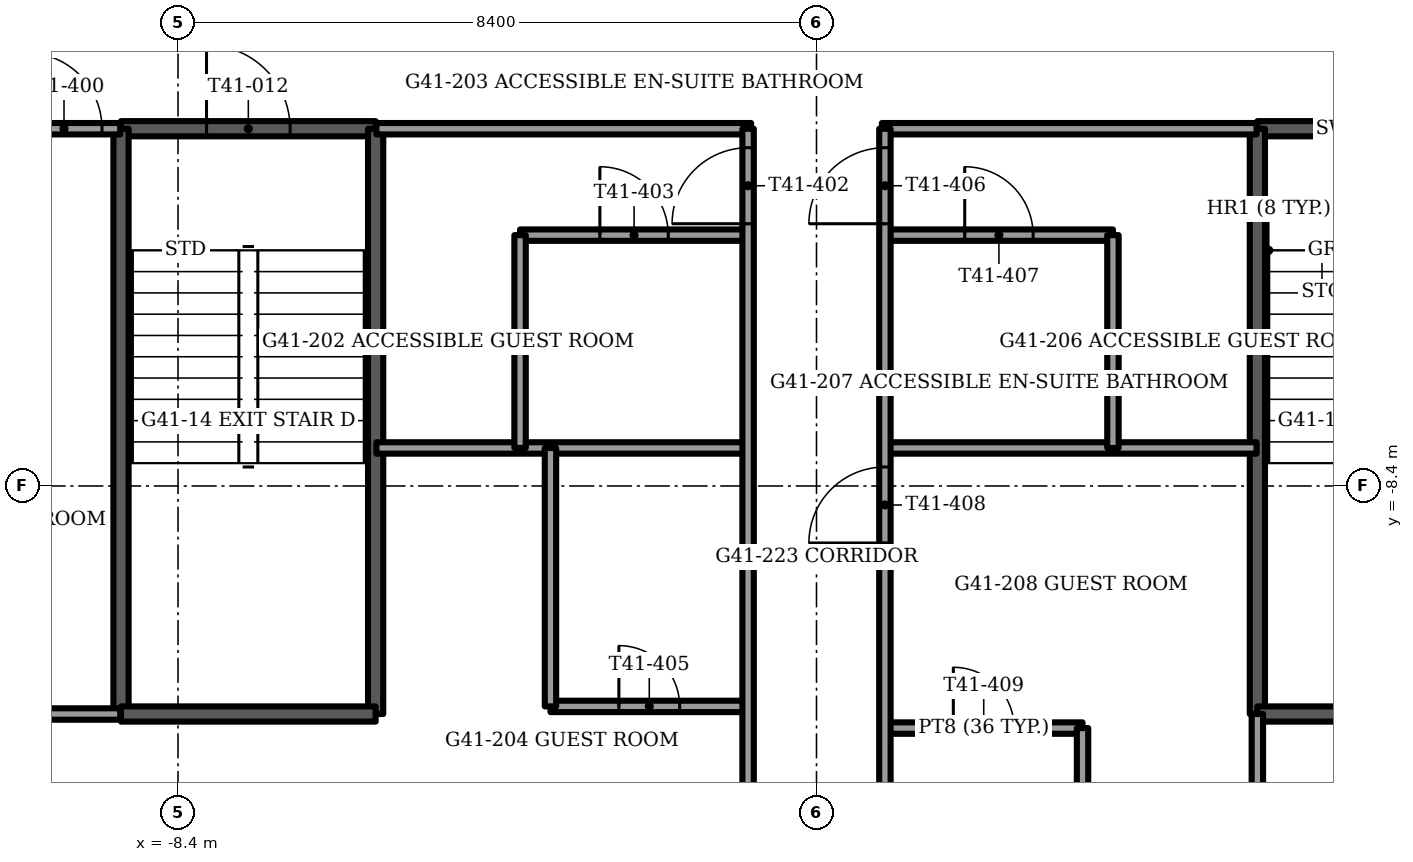
"""IFC4 building model, lengths in metres.
Left out: names, types, materials, properties, quantities, classifications, styles, units other than length and angle.
Written with IfcOpenShell. Run it as: python <this file> out.ifc"""

import sys

from ifc_helpers import new_model, si_unit, direction, frame, frame_2d, origin, place, context, subcontext, project, spatial, rectangle, extrude, element, fill, save


model = new_model("IFC4")
c1 = context("Model", 3, precision=1e-05, world=origin(), true_north=direction((0.0, 1.0)))
c2 = subcontext(c1, "Body", "Model", "MODEL_VIEW")
j1 = project(units=[si_unit("LENGTHUNIT", "METRE"), si_unit("PLANEANGLEUNIT", "RADIAN")], contexts=[c1])
p1 = place(None, origin())
s1 = spatial("IfcSite", under=j1, at=p1, CompositionType="ELEMENT")
p2 = place(p1, origin())
s2 = spatial("IfcBuilding", under=s1, at=p2, CompositionType="ELEMENT")
p3 = place(p2, frame((0.0, 0.0, 168.25)))
s3 = spatial("IfcBuildingStorey", under=s2, at=p3, CompositionType="ELEMENT", Elevation=168.25)
p4 = place(p3, frame((-17.287, -0.909, 0.0), z_axis=(0.0, 0.0, 1.0), x_axis=(0.500004460396, -0.866022828558, 0.0)))
e1 = element("IfcWall", 1, at=p4, inside=s3, PredefinedType="SOLIDWALL", context=c2, shape_type="SweptSolid", body=[
    extrude(rectangle(XDim=15.712, YDim=0.15, at=frame_2d((7.856, 0.0))), origin(), (0.0, 0.0, 1.0), 3.45),
])
p5 = place(p4, frame((1.856, 0.0, 0.15)))
e2 = element("IfcOpeningElement", 2, at=p5, cuts=e1, PredefinedType="OPENING", context=c2, shape_type="SweptSolid", body=[
    extrude(rectangle(XDim=0.9, YDim=2.85, at=frame_2d((0.45, 1.425))), frame((0.0, 0.075, 0.0), z_axis=(0.0, -1.0, 0.0), x_axis=(1.0, 0.0, 0.0)), (0.0, 0.0, 1.0), 0.15),
])
p6 = place(p4, frame((4.056, 0.0, 0.15)))
e3 = element("IfcOpeningElement", 3, at=p6, cuts=e1, PredefinedType="OPENING", context=c2, shape_type="SweptSolid", body=[
    extrude(rectangle(XDim=1.4, YDim=2.85, at=frame_2d((0.7, 1.425))), frame((0.0, 0.075, 0.0), z_axis=(0.0, -1.0, 0.0), x_axis=(1.0, 0.0, 0.0)), (0.0, 0.0, 1.0), 0.15),
])
p7 = place(p4, frame((6.549, 0.0, 0.15)))
e4 = element("IfcOpeningElement", 4, at=p7, cuts=e1, PredefinedType="OPENING", context=c2, shape_type="SweptSolid", body=[
    extrude(rectangle(XDim=1.6, YDim=2.85, at=frame_2d((0.8, 1.425))), frame((0.0, 0.075, 0.0), z_axis=(0.0, -1.0, 0.0), x_axis=(1.0, 0.0, 0.0)), (0.0, 0.0, 1.0), 0.15),
])
p8 = place(p4, frame((8.256, 0.0, 0.0)))
e5 = element("IfcOpeningElement", 5, at=p8, cuts=e1, PredefinedType="OPENING", context=c2, shape_type="SweptSolid", body=[
    extrude(rectangle(XDim=1.4, YDim=2.4, at=frame_2d((0.7, 1.2))), frame((0.0, 0.075, 0.0), z_axis=(0.0, -1.0, 0.0), x_axis=(1.0, 0.0, 0.0)), (0.0, 0.0, 1.0), 0.15),
])
p9 = place(p4, frame((10.256, 0.0, 0.15)))
e6 = element("IfcOpeningElement", 6, at=p9, cuts=e1, PredefinedType="OPENING", context=c2, shape_type="SweptSolid", body=[
    extrude(rectangle(XDim=0.9, YDim=2.85, at=frame_2d((0.45, 1.425))), frame((0.0, 0.075, 0.0), z_axis=(0.0, -1.0, 0.0), x_axis=(1.0, 0.0, 0.0)), (0.0, 0.0, 1.0), 0.15),
])
p10 = place(p3, frame((5.8, -3.7, -0.3), z_axis=(0.0, 0.0, 1.0), x_axis=(1.0, 0.0, 0.0)))
e7 = element("IfcWall", 7, at=p10, inside=s3, PredefinedType="SOLIDWALL", context=c2, shape_type="SweptSolid", body=[
    extrude(rectangle(XDim=3.35, YDim=0.2, at=frame_2d((1.675, 0.0))), origin(), (0.0, 0.0, 1.0), 3.75),
])
p11 = place(p10, frame((1.125, 0.0, 0.0)))
e8 = element("IfcOpeningElement", 8, at=p11, cuts=e7, PredefinedType="OPENING", context=c2, shape_type="SweptSolid", body=[
    extrude(rectangle(XDim=1.1, YDim=2.1, at=frame_2d((0.55, 1.05))), frame((0.0, 0.1, 0.0), z_axis=(0.0, -1.0, 0.0), x_axis=(1.0, 0.0, 0.0)), (0.0, 0.0, 1.0), 0.2),
])
p12 = place(p3, frame((5.8, -3.7, -0.3), z_axis=(0.0, 0.0, 1.0), x_axis=(0.0, -1.0, 0.0)))
e9 = element("IfcWall", 9, at=p12, inside=s3, PredefinedType="SOLIDWALL", context=c2, shape_type="SweptSolid", body=[
    extrude(rectangle(XDim=7.7, YDim=0.2, at=frame_2d((3.85, 0.0))), origin(), (0.0, 0.0, 1.0), 3.75),
])
p13 = place(p3, frame((5.8, -11.4, -0.3), z_axis=(0.0, 0.0, 1.0), x_axis=(1.0, 0.0, 0.0)))
e10 = element("IfcWall", 10, at=p13, inside=s3, PredefinedType="SOLIDWALL", context=c2, shape_type="SweptSolid", body=[
    extrude(rectangle(XDim=3.35, YDim=0.2, at=frame_2d((1.675, 0.0))), origin(), (0.0, 0.0, 1.0), 3.75),
])
p14 = place(p3, frame((5.8, -11.4, 0.0), z_axis=(0.0, 0.0, 1.0), x_axis=(0.0, -1.0, 0.0)))
e11 = element("IfcWall", 11, at=p14, inside=s3, PredefinedType="PARTITIONING", context=c2, shape_type="SweptSolid", body=[
    extrude(rectangle(XDim=3.574, YDim=0.15, at=frame_2d((1.787, 0.0))), origin(), (0.0, 0.0, 1.0), 3.45),
])
p15 = place(p3, frame((-9.15, -3.7, -0.3), z_axis=(0.0, 0.0, 1.0), x_axis=(1.0, 0.0, 0.0)))
e12 = element("IfcWall", 12, at=p15, inside=s3, PredefinedType="SOLIDWALL", context=c2, shape_type="SweptSolid", body=[
    extrude(rectangle(XDim=3.35, YDim=0.2, at=frame_2d((1.675, 0.0))), origin(), (0.0, 0.0, 1.0), 3.75),
])
p16 = place(p15, frame((1.125, 0.0, 0.0)))
e13 = element("IfcOpeningElement", 13, at=p16, cuts=e12, PredefinedType="OPENING", context=c2, shape_type="SweptSolid", body=[
    extrude(rectangle(XDim=1.1, YDim=2.1, at=frame_2d((0.55, 1.05))), frame((0.0, 0.1, 0.0), z_axis=(0.0, -1.0, 0.0), x_axis=(1.0, 0.0, 0.0)), (0.0, 0.0, 1.0), 0.2),
])
for number, where, z_axis, x_axis in (
    (14, (-9.15, -3.7, -0.3), (0.0, 0.0, 1.0), (0.0, -1.0, 0.0)),
    (15, (-5.8, -3.7, -0.3), (0.0, 0.0, 1.0), (0.0, -1.0, 0.0)),
):
    element("IfcWall", number, at=place(p3, frame(where, z_axis=z_axis, x_axis=x_axis)), inside=s3, PredefinedType="SOLIDWALL", context=c2, shape_type="SweptSolid", body=[
        extrude(rectangle(XDim=7.7, YDim=0.2, at=frame_2d((3.85, 0.0))), origin(), (0.0, 0.0, 1.0), 3.75),
    ])
p17 = place(p3, frame((-9.15, -11.4, -0.3), z_axis=(0.0, 0.0, 1.0), x_axis=(1.0, 0.0, 0.0)))
e16 = element("IfcWall", 16, at=p17, inside=s3, PredefinedType="SOLIDWALL", context=c2, shape_type="SweptSolid", body=[
    extrude(rectangle(XDim=3.35, YDim=0.2, at=frame_2d((1.675, 0.0))), origin(), (0.0, 0.0, 1.0), 3.75),
])
p18 = place(p3, frame((0.9, -11.585, 0.0), z_axis=(0.0, 0.0, 1.0), x_axis=(1.0, 0.0, 0.0)))
e17 = element("IfcWall", 17, at=p18, inside=s3, PredefinedType="PARTITIONING", context=c2, shape_type="SweptSolid", body=[
    extrude(rectangle(XDim=2.6, YDim=0.15, at=frame_2d((1.3, 0.0))), origin(), (0.0, 0.0, 1.0), 3.45),
])
p19 = place(p18, frame((0.9, 0.0, 0.0)))
e18 = element("IfcOpeningElement", 18, at=p19, cuts=e17, PredefinedType="OPENING", context=c2, shape_type="SweptSolid", body=[
    extrude(rectangle(XDim=0.8, YDim=2.1, at=frame_2d((0.4, 1.05))), frame((0.0, 0.075, 0.0), z_axis=(0.0, -1.0, 0.0), x_axis=(1.0, 0.0, 0.0)), (0.0, 0.0, 1.0), 0.15),
])
p20 = place(p3, frame((-11.281, -11.4, 0.0), z_axis=(0.0, 0.0, 1.0), x_axis=(1.0, 0.0, 0.0)))
e19 = element("IfcWall", 19, at=p20, inside=s3, PredefinedType="PARTITIONING", context=c2, shape_type="SweptSolid", body=[
    extrude(rectangle(XDim=2.121, YDim=0.15, at=frame_2d((1.061, 0.0))), origin(), (0.0, 0.0, 1.0), 3.45),
])
p21 = place(p3, frame((-3.5, -11.3, 0.0), z_axis=(0.0, 0.0, 1.0), x_axis=(1.0, 0.0, 0.0)))
e20 = element("IfcWall", 20, at=p21, inside=s3, PredefinedType="PARTITIONING", context=c2, shape_type="SweptSolid", body=[
    extrude(rectangle(XDim=2.6, YDim=0.15, at=frame_2d((1.3, 0.0))), origin(), (0.0, 0.0, 1.0), 3.45),
])
p22 = place(p21, frame((0.9, 0.0, 0.0)))
e21 = element("IfcOpeningElement", 21, at=p22, cuts=e20, PredefinedType="OPENING", context=c2, shape_type="SweptSolid", body=[
    extrude(rectangle(XDim=0.8, YDim=2.1, at=frame_2d((0.4, 1.05))), frame((0.0, 0.075, 0.0), z_axis=(0.0, -1.0, 0.0), x_axis=(1.0, 0.0, 0.0)), (0.0, 0.0, 1.0), 0.15),
])
for number, where, z_axis, x_axis in (
    (22, (-5.79, -7.9, 0.0), (0.0, 0.0, 1.0), (1.0, 0.0, 0.0)),
    (23, (0.9, -7.9, 0.0), (0.0, 0.0, 1.0), (1.0, 0.0, 0.0)),
):
    element("IfcWall", number, at=place(p3, frame(where, z_axis=z_axis, x_axis=x_axis)), inside=s3, PredefinedType="PARTITIONING", context=c2, shape_type="SweptSolid", body=[
        extrude(rectangle(XDim=4.89, YDim=0.15, at=frame_2d((2.445, 0.0))), origin(), (0.0, 0.0, 1.0), 3.45),
    ])
p23 = place(p3, frame((-3.9, -5.1, 0.0), z_axis=(0.0, 0.0, 1.0), x_axis=(1.0, 0.0, 0.0)))
e24 = element("IfcWall", 24, at=p23, inside=s3, PredefinedType="PARTITIONING", context=c2, shape_type="SweptSolid", body=[
    extrude(rectangle(XDim=3.0, YDim=0.15, at=frame_2d((1.5, 0.0))), origin(), (0.0, 0.0, 1.0), 3.45),
])
p24 = place(p23, frame((1.05, 0.0, 0.0)))
e25 = element("IfcOpeningElement", 25, at=p24, cuts=e24, PredefinedType="OPENING", context=c2, shape_type="SweptSolid", body=[
    extrude(rectangle(XDim=0.9, YDim=2.1, at=frame_2d((0.45, 1.05))), frame((0.0, 0.075, 0.0), z_axis=(0.0, -1.0, 0.0), x_axis=(1.0, 0.0, 0.0)), (0.0, 0.0, 1.0), 0.15),
])
p25 = place(p3, frame((0.9, -5.1, 0.0), z_axis=(0.0, 0.0, 1.0), x_axis=(1.0, 0.0, 0.0)))
e26 = element("IfcWall", 26, at=p25, inside=s3, PredefinedType="PARTITIONING", context=c2, shape_type="SweptSolid", body=[
    extrude(rectangle(XDim=3.0, YDim=0.15, at=frame_2d((1.5, 0.0))), origin(), (0.0, 0.0, 1.0), 3.45),
])
p26 = place(p25, frame((1.05, 0.0, 0.0)))
e27 = element("IfcOpeningElement", 27, at=p26, cuts=e26, PredefinedType="OPENING", context=c2, shape_type="SweptSolid", body=[
    extrude(rectangle(XDim=0.9, YDim=2.1, at=frame_2d((0.45, 1.05))), frame((0.0, 0.075, 0.0), z_axis=(0.0, -1.0, 0.0), x_axis=(1.0, 0.0, 0.0)), (0.0, 0.0, 1.0), 0.15),
])
p27 = place(p3, frame((-15.727, -3.7, 0.0), z_axis=(0.0, 0.0, 1.0), x_axis=(1.0, 0.0, 0.0)))
e28 = element("IfcWall", 28, at=p27, inside=s3, PredefinedType="PARTITIONING", context=c2, shape_type="SweptSolid", body=[
    extrude(rectangle(XDim=6.567, YDim=0.15, at=frame_2d((3.284, 0.0))), origin(), (0.0, 0.0, 1.0), 3.45),
])
p28 = place(p27, frame((5.327, 0.0, 0.0)))
e29 = element("IfcOpeningElement", 29, at=p28, cuts=e28, PredefinedType="OPENING", context=c2, shape_type="SweptSolid", body=[
    extrude(rectangle(XDim=1.0, YDim=2.1, at=frame_2d((0.5, 1.05))), frame((0.0, 0.075, 0.0), z_axis=(0.0, -1.0, 0.0), x_axis=(1.0, 0.0, 0.0)), (0.0, 0.0, 1.0), 0.15),
])
for number, where, z_axis, x_axis in (
    (30, (-5.79, -3.7, 0.0), (0.0, 0.0, 1.0), (1.0, 0.0, 0.0)),
    (31, (0.86, -3.7, 0.0), (0.0, 0.0, 1.0), (1.0, 0.0, 0.0)),
):
    element("IfcWall", number, at=place(p3, frame(where, z_axis=z_axis, x_axis=x_axis)), inside=s3, PredefinedType="PARTITIONING", context=c2, shape_type="SweptSolid", body=[
        extrude(rectangle(XDim=4.93, YDim=0.15, at=frame_2d((2.465, 0.0))), origin(), (0.0, 0.0, 1.0), 3.45),
    ])
p29 = place(p3, frame((3.9, -7.9, 0.0), z_axis=(0.0, 0.0, 1.0), x_axis=(0.0, 1.0, 0.0)))
e32 = element("IfcWall", 32, at=p29, inside=s3, PredefinedType="PARTITIONING", context=c2, shape_type="SweptSolid", body=[
    extrude(rectangle(XDim=2.8, YDim=0.15, at=frame_2d((1.4, 0.0))), origin(), (0.0, 0.0, 1.0), 3.45),
])
p30 = place(p3, frame((3.5, -15.094, 0.0), z_axis=(0.0, 0.0, 1.0), x_axis=(0.0, 1.0, 0.0)))
e33 = element("IfcWall", 33, at=p30, inside=s3, PredefinedType="PARTITIONING", context=c2, shape_type="SweptSolid", body=[
    extrude(rectangle(XDim=3.509, YDim=0.15, at=frame_2d((1.754, 0.0))), origin(), (0.0, 0.0, 1.0), 3.45),
])
p31 = place(p3, frame((0.9, -15.094, 0.0), z_axis=(0.0, 0.0, 1.0), x_axis=(0.0, 1.0, 0.0)))
e34 = element("IfcWall", 34, at=p31, inside=s3, PredefinedType="PARTITIONING", context=c2, shape_type="SweptSolid", body=[
    extrude(rectangle(XDim=11.394, YDim=0.15, at=frame_2d((5.697, 0.0))), origin(), (0.0, 0.0, 1.0), 3.45),
])
p32 = place(p31, frame((10.144, 0.0, 0.0)))
e35 = element("IfcOpeningElement", 35, at=p32, cuts=e34, PredefinedType="OPENING", context=c2, shape_type="SweptSolid", body=[
    extrude(rectangle(XDim=1.0, YDim=2.1, at=frame_2d((0.5, 1.05))), frame((0.0, 0.075, 0.0), z_axis=(0.0, -1.0, 0.0), x_axis=(1.0, 0.0, 0.0)), (0.0, 0.0, 1.0), 0.15),
])
p33 = place(p31, frame((5.944, 0.0, 0.0)))
e36 = element("IfcOpeningElement", 36, at=p33, cuts=e34, PredefinedType="OPENING", context=c2, shape_type="SweptSolid", body=[
    extrude(rectangle(XDim=1.0, YDim=2.1, at=frame_2d((0.5, 1.05))), frame((0.0, 0.075, 0.0), z_axis=(0.0, -1.0, 0.0), x_axis=(1.0, 0.0, 0.0)), (0.0, 0.0, 1.0), 0.15),
])
p34 = place(p3, frame((-0.9, -15.094, 0.0), z_axis=(0.0, 0.0, 1.0), x_axis=(0.0, 1.0, 0.0)))
e37 = element("IfcWall", 37, at=p34, inside=s3, PredefinedType="PARTITIONING", context=c2, shape_type="SweptSolid", body=[
    extrude(rectangle(XDim=11.394, YDim=0.15, at=frame_2d((5.697, 0.0))), origin(), (0.0, 0.0, 1.0), 3.45),
])
p35 = place(p34, frame((10.144, 0.0, 0.0)))
e38 = element("IfcOpeningElement", 38, at=p35, cuts=e37, PredefinedType="OPENING", context=c2, shape_type="SweptSolid", body=[
    extrude(rectangle(XDim=1.0, YDim=2.1, at=frame_2d((0.5, 1.05))), frame((0.0, 0.075, 0.0), z_axis=(0.0, -1.0, 0.0), x_axis=(1.0, 0.0, 0.0)), (0.0, 0.0, 1.0), 0.15),
])
p36 = place(p34, frame((0.369, 0.0, 0.0)))
e39 = element("IfcOpeningElement", 39, at=p36, cuts=e37, PredefinedType="OPENING", context=c2, shape_type="SweptSolid", body=[
    extrude(rectangle(XDim=1.0, YDim=2.1, at=frame_2d((0.5, 1.05))), frame((0.0, 0.075, 0.0), z_axis=(0.0, -1.0, 0.0), x_axis=(1.0, 0.0, 0.0)), (0.0, 0.0, 1.0), 0.15),
])
p37 = place(p3, frame((-3.5, -11.3, 0.0), z_axis=(0.0, 0.0, 1.0), x_axis=(0.0, 1.0, 0.0)))
e40 = element("IfcWall", 40, at=p37, inside=s3, PredefinedType="PARTITIONING", context=c2, shape_type="SweptSolid", body=[
    extrude(rectangle(XDim=3.4, YDim=0.15, at=frame_2d((1.7, 0.0))), origin(), (0.0, 0.0, 1.0), 3.45),
])
p38 = place(p3, frame((-3.9, -7.9, 0.0), z_axis=(0.0, 0.0, 1.0), x_axis=(0.0, 1.0, 0.0)))
e41 = element("IfcWall", 41, at=p38, inside=s3, PredefinedType="PARTITIONING", context=c2, shape_type="SweptSolid", body=[
    extrude(rectangle(XDim=2.8, YDim=0.15, at=frame_2d((1.4, 0.0))), origin(), (0.0, 0.0, 1.0), 3.45),
])
p39 = place(p16, origin())
e42 = element("IfcDoor", 42, at=p39, inside=s3, OperationType="SINGLE_SWING_LEFT", PredefinedType="DOOR", context=c2, shape_type="SweptSolid", body=[
    extrude(rectangle(XDim=1.1, YDim=2.1, at=frame_2d((0.55, 1.05))), frame((0.0, 0.025, 0.0), z_axis=(0.0, -1.0, 0.0), x_axis=(1.0, 0.0, 0.0)), (0.0, 0.0, 1.0), 0.05),
])
fill(e13, e42)
p40 = place(p28, origin())
e43 = element("IfcDoor", 43, at=p40, inside=s3, OperationType="SINGLE_SWING_RIGHT", PredefinedType="DOOR", context=c2, shape_type="SweptSolid", body=[
    extrude(rectangle(XDim=1.0, YDim=2.1, at=frame_2d((0.5, 1.05))), frame((0.0, 0.025, 0.0), z_axis=(0.0, -1.0, 0.0), x_axis=(1.0, 0.0, 0.0)), (0.0, 0.0, 1.0), 0.05),
])
fill(e29, e43)
p41 = place(p35, origin())
e44 = element("IfcDoor", 44, at=p41, inside=s3, OperationType="SINGLE_SWING_RIGHT", PredefinedType="DOOR", context=c2, shape_type="SweptSolid", body=[
    extrude(rectangle(XDim=1.0, YDim=2.1, at=frame_2d((0.5, 1.05))), frame((0.0, 0.025, 0.0), z_axis=(0.0, -1.0, 0.0), x_axis=(1.0, 0.0, 0.0)), (0.0, 0.0, 1.0), 0.05),
])
fill(e38, e44)
p42 = place(p24, origin())
e45 = element("IfcDoor", 45, at=p42, inside=s3, OperationType="SINGLE_SWING_RIGHT", PredefinedType="DOOR", context=c2, shape_type="SweptSolid", body=[
    extrude(rectangle(XDim=0.9, YDim=2.1, at=frame_2d((0.45, 1.05))), frame((0.0, 0.025, 0.0), z_axis=(0.0, -1.0, 0.0), x_axis=(1.0, 0.0, 0.0)), (0.0, 0.0, 1.0), 0.05),
])
fill(e25, e45)
p43 = place(p22, origin())
e46 = element("IfcDoor", 46, at=p43, inside=s3, OperationType="SINGLE_SWING_RIGHT", PredefinedType="DOOR", context=c2, shape_type="SweptSolid", body=[
    extrude(rectangle(XDim=0.8, YDim=2.1, at=frame_2d((0.4, 1.05))), frame((0.0, 0.025, 0.0), z_axis=(0.0, -1.0, 0.0), x_axis=(1.0, 0.0, 0.0)), (0.0, 0.0, 1.0), 0.05),
])
fill(e21, e46)
p44 = place(p32, origin())
e47 = element("IfcDoor", 47, at=p44, inside=s3, OperationType="SINGLE_SWING_RIGHT", PredefinedType="DOOR", context=c2, shape_type="SweptSolid", body=[
    extrude(rectangle(XDim=1.0, YDim=2.1, at=frame_2d((0.5, 1.05))), frame((0.0, 0.025, 0.0), z_axis=(0.0, -1.0, 0.0), x_axis=(1.0, 0.0, 0.0)), (0.0, 0.0, 1.0), 0.05),
])
fill(e35, e47)
p45 = place(p26, origin())
e48 = element("IfcDoor", 48, at=p45, inside=s3, OperationType="SINGLE_SWING_LEFT", PredefinedType="DOOR", context=c2, shape_type="SweptSolid", body=[
    extrude(rectangle(XDim=0.9, YDim=2.1, at=frame_2d((0.45, 1.05))), frame((0.0, 0.025, 0.0), z_axis=(0.0, -1.0, 0.0), x_axis=(1.0, 0.0, 0.0)), (0.0, 0.0, 1.0), 0.05),
])
fill(e27, e48)
p46 = place(p33, origin())
e49 = element("IfcDoor", 49, at=p46, inside=s3, OperationType="SINGLE_SWING_RIGHT", PredefinedType="DOOR", context=c2, shape_type="SweptSolid", body=[
    extrude(rectangle(XDim=1.0, YDim=2.1, at=frame_2d((0.5, 1.05))), frame((0.0, 0.025, 0.0), z_axis=(0.0, -1.0, 0.0), x_axis=(1.0, 0.0, 0.0)), (0.0, 0.0, 1.0), 0.05),
])
fill(e36, e49)
p47 = place(p19, origin())
e50 = element("IfcDoor", 50, at=p47, inside=s3, OperationType="SINGLE_SWING_LEFT", PredefinedType="DOOR", context=c2, shape_type="SweptSolid", body=[
    extrude(rectangle(XDim=0.8, YDim=2.1, at=frame_2d((0.4, 1.05))), frame((0.0, 0.025, 0.0), z_axis=(0.0, -1.0, 0.0), x_axis=(1.0, 0.0, 0.0)), (0.0, 0.0, 1.0), 0.05),
])
fill(e18, e50)
save(model, sys.argv[1])
